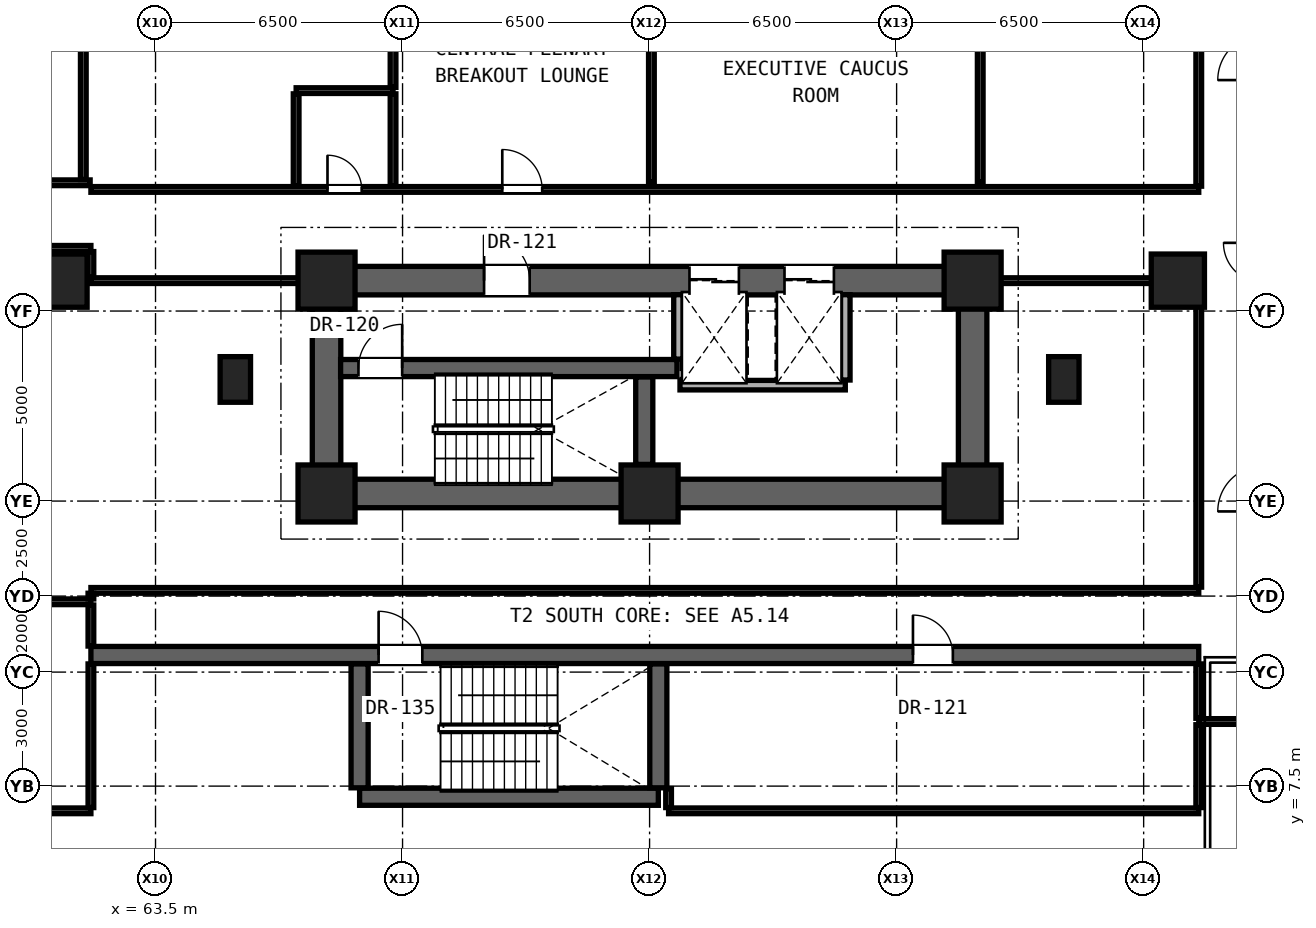
"""IFC4 building model, lengths in metres.
Left out: names, types, materials, properties, quantities, classifications, styles, units other than length and angle.
Written with IfcOpenShell. Run it as: python <this file> out.ifc"""

import sys

from ifc_helpers import new_model, si_unit, direction, frame, frame_2d, origin, origin_2d, place, context, subcontext, project, spatial, rectangle, hollow_rectangle, extrude, element, fill, save


model = new_model("IFC4")
c1 = context("Model", 3, precision=1e-05, world=origin(), true_north=direction((0.0, 1.0)))
c2 = subcontext(c1, "Body", "Model", "MODEL_VIEW")
j1 = project(units=[si_unit("LENGTHUNIT", "METRE"), si_unit("PLANEANGLEUNIT", "RADIAN")], contexts=[c1])
p1 = place(None, origin())
s1 = spatial("IfcSite", under=j1, at=p1, CompositionType="ELEMENT")
p2 = place(p1, origin())
s2 = spatial("IfcBuilding", under=s1, at=p2, CompositionType="ELEMENT")
p3 = place(p2, frame((0.0, 0.0, 13.8)))
s3 = spatial("IfcBuildingStorey", under=s2, at=p3, CompositionType="ELEMENT", Elevation=13.8)
for number, where, z_axis, x_axis in (
    (1, (68.0, 15.2, 0.0), (0.0, 0.0, 1.0), (1.0, 0.0, 0.0)),
    (2, (76.5, 15.2, 0.0), (0.0, 0.0, 1.0), (1.0, 0.0, 0.0)),
    (3, (85.0, 15.2, 0.0), (0.0, 0.0, 1.0), (1.0, 0.0, 0.0)),
    (4, (68.0, 20.8, 0.0), (0.0, 0.0, 1.0), (1.0, 0.0, 0.0)),
    (5, (85.0, 20.8, 0.0), (0.0, 0.0, 1.0), (1.0, 0.0, 0.0)),
):
    element("IfcColumn", number, at=place(p3, frame(where, z_axis=z_axis, x_axis=x_axis)), inside=s3, PredefinedType="COLUMN", context=c2, shape_type="SweptSolid", body=[
        extrude(rectangle(XDim=1.5, YDim=1.5, at=origin_2d()), origin(), (0.0, 0.0, 1.0), 4.3),
    ])
for number, where, z_axis, x_axis in (
    (6, (61.0, 20.8, 0.0), (0.0, 0.0, 1.0), (1.0, 0.0, 0.0)),
    (7, (90.4, 20.8, 0.0), (0.0, 0.0, 1.0), (1.0, 0.0, 0.0)),
):
    element("IfcColumn", number, at=place(p3, frame(where, z_axis=z_axis, x_axis=x_axis)), inside=s3, PredefinedType="COLUMN", context=c2, shape_type="SweptSolid", body=[
        extrude(hollow_rectangle(XDim=1.4, YDim=1.4, WallThickness=0.08, at=origin_2d()), origin(), (0.0, 0.0, 1.0), 4.3),
    ])
for number, where, z_axis, x_axis in (
    (8, (65.6, 18.2, 0.0), (0.0, 0.0, 1.0), (1.0, 0.0, 0.0)),
    (9, (87.4, 18.2, 0.0), (0.0, 0.0, 1.0), (1.0, 0.0, 0.0)),
):
    element("IfcColumn", number, at=place(p3, frame(where, z_axis=z_axis, x_axis=x_axis)), inside=s3, PredefinedType="PILASTER", context=c2, shape_type="SweptSolid", body=[
        extrude(rectangle(XDim=0.8, YDim=1.2, at=origin_2d()), origin(), (0.0, 0.0, 1.0), 4.3),
    ])
p4 = place(p3, frame((68.0, 15.2, 0.0), z_axis=(0.0, 0.0, 1.0), x_axis=(1.0, 0.0, 0.0)))
e10 = element("IfcWall", 10, at=p4, inside=s3, PredefinedType="SHEAR", context=c2, shape_type="SweptSolid", body=[
    extrude(rectangle(XDim=17.0, YDim=0.75, at=frame_2d((8.5, 0.0))), origin(), (0.0, 0.0, 1.0), 3.65),
])
for number, where, z_axis, x_axis in (
    (11, (68.0, 15.2, 0.0), (0.0, 0.0, 1.0), (0.0, 1.0, 0.0)),
    (12, (85.0, 15.2, 0.0), (0.0, 0.0, 1.0), (0.0, 1.0, 0.0)),
):
    element("IfcWall", number, at=place(p3, frame(where, z_axis=z_axis, x_axis=x_axis)), inside=s3, PredefinedType="SHEAR", context=c2, shape_type="SweptSolid", body=[
        extrude(rectangle(XDim=5.6, YDim=0.75, at=frame_2d((2.8, 0.0))), origin(), (0.0, 0.0, 1.0), 3.65),
    ])
p5 = place(p3, frame((68.0, 20.8, 0.0), z_axis=(0.0, 0.0, 1.0), x_axis=(1.0, 0.0, 0.0)))
e13 = element("IfcWall", 13, at=p5, inside=s3, PredefinedType="SHEAR", context=c2, shape_type="SweptSolid", body=[
    extrude(rectangle(XDim=17.0, YDim=0.75, at=frame_2d((8.5, 0.0))), origin(), (0.0, 0.0, 1.0), 3.65),
])
p6 = place(p5, frame((4.145, 0.0, 0.0)))
e14 = element("IfcOpeningElement", 14, at=p6, cuts=e13, PredefinedType="OPENING", context=c2, shape_type="SweptSolid", body=[
    extrude(rectangle(XDim=1.2, YDim=2.25, at=frame_2d((0.6, 1.125))), frame((0.0, 0.385, 0.0), z_axis=(0.0, -1.0, 0.0), x_axis=(1.0, 0.0, 0.0)), (0.0, 0.0, 1.0), 0.77),
])
p7 = place(p5, frame((9.55, 0.0, 0.0)))
e15 = element("IfcOpeningElement", 15, at=p7, cuts=e13, PredefinedType="OPENING", context=c2, shape_type="SweptSolid", body=[
    extrude(rectangle(XDim=1.3, YDim=2.3, at=frame_2d((0.65, 1.15))), frame((0.0, 0.385, 0.0), z_axis=(0.0, -1.0, 0.0), x_axis=(1.0, 0.0, 0.0)), (0.0, 0.0, 1.0), 0.77),
])
p8 = place(p5, frame((12.05, 0.0, 0.0)))
e16 = element("IfcOpeningElement", 16, at=p8, cuts=e13, PredefinedType="OPENING", context=c2, shape_type="SweptSolid", body=[
    extrude(rectangle(XDim=1.3, YDim=2.3, at=frame_2d((0.65, 1.15))), frame((0.0, 0.385, 0.0), z_axis=(0.0, -1.0, 0.0), x_axis=(1.0, 0.0, 0.0)), (0.0, 0.0, 1.0), 0.77),
])
p9 = place(p3, frame((29.4, 6.85, 0.0), z_axis=(0.0, 0.0, 1.0), x_axis=(1.0, 0.0, 0.0)))
e17 = element("IfcWall", 17, at=p9, inside=s3, PredefinedType="PARTITIONING", context=c2, shape_type="SweptSolid", body=[
    extrude(rectangle(XDim=32.4, YDim=0.15, at=frame_2d((16.2, 0.0))), origin(), (0.0, 0.0, 1.0), 2.869),
])
p10 = place(p3, frame((77.0, 6.85, 0.0), z_axis=(0.0, 0.0, 1.0), x_axis=(1.0, 0.0, 0.0)))
e18 = element("IfcWall", 18, at=p10, inside=s3, PredefinedType="PARTITIONING", context=c2, shape_type="SweptSolid", body=[
    extrude(rectangle(XDim=13.95, YDim=0.15, at=frame_2d((6.975, 0.0))), origin(), (0.0, 0.0, 1.0), 2.786),
])
p11 = place(p3, frame((68.87, 7.22, 0.0), z_axis=(0.0, 0.0, 1.0), x_axis=(1.0, 0.0, 0.0)))
e19 = element("IfcWall", 19, at=p11, inside=s3, PredefinedType="SHEAR", context=c2, shape_type="SweptSolid", body=[
    extrude(rectangle(XDim=7.86, YDim=0.45, at=frame_2d((3.93, 0.0))), origin(), (0.0, 0.0, 1.0), 3.65),
])
p12 = place(p3, frame((90.95, 9.2, 0.0), z_axis=(0.0, 0.0, 1.0), x_axis=(1.0, 0.0, 0.0)))
e20 = element("IfcWall", 20, at=p12, inside=s3, PredefinedType="PARTITIONING", context=c2, shape_type="SweptSolid", body=[
    extrude(rectangle(XDim=1.7, YDim=0.15, at=frame_2d((0.85, 0.0))), origin(), (0.0, 0.0, 1.0), 3.65),
])
p13 = place(p3, frame((61.8, 10.95, 0.0), z_axis=(0.0, 0.0, 1.0), x_axis=(1.0, 0.0, 0.0)))
e21 = element("IfcWall", 21, at=p13, inside=s3, PredefinedType="SHEAR", context=c2, shape_type="SweptSolid", body=[
    extrude(rectangle(XDim=29.15, YDim=0.45, at=frame_2d((14.575, 0.0))), origin(), (0.0, 0.0, 1.0), 3.65),
])
p14 = place(p13, frame((7.57, 0.0, 0.0)))
e22 = element("IfcOpeningElement", 22, at=p14, cuts=e21, PredefinedType="OPENING", context=c2, shape_type="SweptSolid", body=[
    extrude(rectangle(XDim=1.15, YDim=2.2, at=frame_2d((0.575, 1.1))), frame((0.0, 0.235, 0.0), z_axis=(0.0, -1.0, 0.0), x_axis=(1.0, 0.0, 0.0)), (0.0, 0.0, 1.0), 0.47),
])
p15 = place(p13, frame((21.63, 0.0, 0.0)))
e23 = element("IfcOpeningElement", 23, at=p15, cuts=e21, PredefinedType="OPENING", context=c2, shape_type="SweptSolid", body=[
    extrude(rectangle(XDim=1.05, YDim=2.2, at=frame_2d((0.525, 1.1))), frame((0.0, 0.235, 0.0), z_axis=(0.0, -1.0, 0.0), x_axis=(1.0, 0.0, 0.0)), (0.0, 0.0, 1.0), 0.47),
])
p16 = place(p3, frame((38.2, 12.35, 0.0), z_axis=(0.0, 0.0, 1.0), x_axis=(1.0, 0.0, 0.0)))
e24 = element("IfcWall", 24, at=p16, inside=s3, PredefinedType="PARTITIONING", context=c2, shape_type="SweptSolid", body=[
    extrude(rectangle(XDim=23.6, YDim=0.15, at=frame_2d((11.8, 0.0))), origin(), (0.0, 0.0, 1.0), 2.602),
])
p17 = place(p3, frame((61.8, 12.65, 0.0), z_axis=(0.0, 0.0, 1.0), x_axis=(1.0, 0.0, 0.0)))
e25 = element("IfcWall", 25, at=p17, inside=s3, PredefinedType="PARTITIONING", context=c2, shape_type="SweptSolid", body=[
    extrude(rectangle(XDim=29.15, YDim=0.15, at=frame_2d((14.575, 0.0))), origin(), (0.0, 0.0, 1.0), 2.786),
])
p18 = place(p3, frame((77.3, 18.05, 0.0), z_axis=(0.0, 0.0, 1.0), x_axis=(1.0, 0.0, 0.0)))
e26 = element("IfcWall", 26, at=p18, inside=s3, PredefinedType="SOLIDWALL", context=c2, shape_type="SweptSolid", body=[
    extrude(rectangle(XDim=4.35, YDim=0.25, at=frame_2d((2.175, 0.0))), origin(), (0.0, 0.0, 1.0), 3.65),
])
p19 = place(p3, frame((68.37, 18.5, 0.0), z_axis=(0.0, 0.0, 1.0), x_axis=(1.0, 0.0, 0.0)))
e27 = element("IfcWall", 27, at=p19, inside=s3, PredefinedType="SHEAR", context=c2, shape_type="SweptSolid", body=[
    extrude(rectangle(XDim=8.85, YDim=0.45, at=frame_2d((4.425, 0.0))), origin(), (0.0, 0.0, 1.0), 3.65),
])
p20 = place(p19, frame((0.47, 0.0, 0.0)))
e28 = element("IfcOpeningElement", 28, at=p20, cuts=e27, PredefinedType="OPENING", context=c2, shape_type="SweptSolid", body=[
    extrude(rectangle(XDim=1.15, YDim=2.2, at=frame_2d((0.575, 1.1))), frame((0.0, 0.235, 0.0), z_axis=(0.0, -1.0, 0.0), x_axis=(1.0, 0.0, 0.0)), (0.0, 0.0, 1.0), 0.47),
])
p21 = place(p3, frame((61.8, 20.8, 0.0), z_axis=(0.0, 0.0, 1.0), x_axis=(1.0, 0.0, 0.0)))
e29 = element("IfcWall", 29, at=p21, inside=s3, PredefinedType="PARTITIONING", context=c2, shape_type="SweptSolid", body=[
    extrude(rectangle(XDim=5.83, YDim=0.15, at=frame_2d((2.915, 0.0))), origin(), (0.0, 0.0, 1.0), 2.542),
])
p22 = place(p3, frame((85.37, 20.8, 0.0), z_axis=(0.0, 0.0, 1.0), x_axis=(1.0, 0.0, 0.0)))
e30 = element("IfcWall", 30, at=p22, inside=s3, PredefinedType="PARTITIONING", context=c2, shape_type="SweptSolid", body=[
    extrude(rectangle(XDim=5.58, YDim=0.15, at=frame_2d((2.79, 0.0))), origin(), (0.0, 0.0, 1.0), 2.542),
])
p23 = place(p3, frame((40.4, 21.65, 0.0), z_axis=(0.0, 0.0, 1.0), x_axis=(1.0, 0.0, 0.0)))
e31 = element("IfcWall", 31, at=p23, inside=s3, PredefinedType="PARTITIONING", context=c2, shape_type="SweptSolid", body=[
    extrude(rectangle(XDim=21.4, YDim=0.15, at=frame_2d((10.7, 0.0))), origin(), (0.0, 0.0, 1.0), 2.602),
])
p24 = place(p3, frame((61.8, 23.2, 0.0), z_axis=(0.0, 0.0, 1.0), x_axis=(1.0, 0.0, 0.0)))
e32 = element("IfcWall", 32, at=p24, inside=s3, PredefinedType="PARTITIONING", context=c2, shape_type="SweptSolid", body=[
    extrude(rectangle(XDim=29.15, YDim=0.15, at=frame_2d((14.575, 0.0))), origin(), (0.0, 0.0, 1.0), 2.715),
])
p25 = place(p24, frame((6.225, 0.0, 0.0)))
e33 = element("IfcOpeningElement", 33, at=p25, cuts=e32, PredefinedType="OPENING", context=c2, shape_type="SweptSolid", body=[
    extrude(rectangle(XDim=0.9, YDim=2.1, at=frame_2d((0.45, 1.05))), frame((0.0, 0.085, 0.0), z_axis=(0.0, -1.0, 0.0), x_axis=(1.0, 0.0, 0.0)), (0.0, 0.0, 1.0), 0.17),
])
p26 = place(p24, frame((10.824, 0.0, 0.0)))
e34 = element("IfcOpeningElement", 34, at=p26, cuts=e32, PredefinedType="OPENING", context=c2, shape_type="SweptSolid", body=[
    extrude(rectangle(XDim=1.05, YDim=2.2, at=frame_2d((0.525, 1.1))), frame((0.0, 0.085, 0.0), z_axis=(0.0, -1.0, 0.0), x_axis=(1.0, 0.0, 0.0)), (0.0, 0.0, 1.0), 0.17),
])
p27 = place(p3, frame((42.65, 23.375, 0.0), z_axis=(0.0, 0.0, 1.0), x_axis=(1.0, 0.0, 0.0)))
e35 = element("IfcWall", 35, at=p27, inside=s3, PredefinedType="PARTITIONING", context=c2, shape_type="SweptSolid", body=[
    extrude(rectangle(XDim=19.13, YDim=0.15, at=frame_2d((9.565, 0.0))), origin(), (0.0, 0.0, 1.0), 2.602),
])
p28 = place(p3, frame((67.2, 25.8, 0.0), z_axis=(0.0, 0.0, 1.0), x_axis=(1.0, 0.0, 0.0)))
e36 = element("IfcWall", 36, at=p28, inside=s3, PredefinedType="PARTITIONING", context=c2, shape_type="SweptSolid", body=[
    extrude(rectangle(XDim=2.55, YDim=0.15, at=frame_2d((1.275, 0.0))), origin(), (0.0, 0.0, 1.0), 2.715),
])
p29 = place(p3, frame((61.6, 23.46, 0.0), z_axis=(0.0, 0.0, 1.0), x_axis=(0.0, 1.0, 0.0)))
e37 = element("IfcWall", 37, at=p29, inside=s3, PredefinedType="PARTITIONING", context=c2, shape_type="SweptSolid", body=[
    extrude(rectangle(XDim=7.855, YDim=0.15, at=frame_2d((3.927, 0.0))), origin(), (0.0, 0.0, 1.0), 2.869),
])
p30 = place(p3, frame((61.8, 6.935, 0.0), z_axis=(0.0, 0.0, 1.0), x_axis=(0.0, 1.0, 0.0)))
e38 = element("IfcWall", 38, at=p30, inside=s3, PredefinedType="PARTITIONING", context=c2, shape_type="SweptSolid", body=[
    extrude(rectangle(XDim=3.78, YDim=0.15, at=frame_2d((1.89, 0.0))), origin(), (0.0, 0.0, 1.0), 3.65),
])
p31 = place(p3, frame((61.8, 11.185, 0.0), z_axis=(0.0, 0.0, 1.0), x_axis=(0.0, 1.0, 0.0)))
e39 = element("IfcWall", 39, at=p31, inside=s3, PredefinedType="PARTITIONING", context=c2, shape_type="SweptSolid", body=[
    extrude(rectangle(XDim=1.08, YDim=0.15, at=frame_2d((0.54, 0.0))), origin(), (0.0, 0.0, 1.0), 3.65),
])
p32 = place(p3, frame((61.8, 12.425, 0.0), z_axis=(0.0, 0.0, 1.0), x_axis=(0.0, 1.0, 0.0)))
e40 = element("IfcWall", 40, at=p32, inside=s3, PredefinedType="PARTITIONING", context=c2, shape_type="SweptSolid", body=[
    extrude(rectangle(XDim=0.15, YDim=0.15, at=frame_2d((0.075, 0.0))), origin(), (0.0, 0.0, 1.0), 3.65),
])
p33 = place(p3, frame((61.8, 20.885, 0.0), z_axis=(0.0, 0.0, 1.0), x_axis=(0.0, 1.0, 0.0)))
e41 = element("IfcWall", 41, at=p33, inside=s3, PredefinedType="PARTITIONING", context=c2, shape_type="SweptSolid", body=[
    extrude(rectangle(XDim=0.68, YDim=0.15, at=frame_2d((0.34, 0.0))), origin(), (0.0, 0.0, 1.0), 2.542),
])
p34 = place(p3, frame((67.2, 23.285, 0.0), z_axis=(0.0, 0.0, 1.0), x_axis=(0.0, 1.0, 0.0)))
e42 = element("IfcWall", 42, at=p34, inside=s3, PredefinedType="PARTITIONING", context=c2, shape_type="SweptSolid", body=[
    extrude(rectangle(XDim=2.43, YDim=0.15, at=frame_2d((1.215, 0.0))), origin(), (0.0, 0.0, 1.0), 3.65),
])
p35 = place(p3, frame((68.87, 7.455, 0.0), z_axis=(0.0, 0.0, 1.0), x_axis=(0.0, 1.0, 0.0)))
e43 = element("IfcWall", 43, at=p35, inside=s3, PredefinedType="SHEAR", context=c2, shape_type="SweptSolid", body=[
    extrude(rectangle(XDim=3.26, YDim=0.45, at=frame_2d((1.63, 0.0))), origin(), (0.0, 0.0, 1.0), 3.65),
])
p36 = place(p3, frame((69.75, 23.285, 0.0), z_axis=(0.0, 0.0, 1.0), x_axis=(0.0, 1.0, 0.0)))
e44 = element("IfcWall", 44, at=p36, inside=s3, PredefinedType="PARTITIONING", context=c2, shape_type="SweptSolid", body=[
    extrude(rectangle(XDim=2.43, YDim=0.15, at=frame_2d((1.215, 0.0))), origin(), (0.0, 0.0, 1.0), 3.65),
])
p37 = place(p3, frame((69.75, 25.885, 0.0), z_axis=(0.0, 0.0, 1.0), x_axis=(0.0, 1.0, 0.0)))
e45 = element("IfcWall", 45, at=p37, inside=s3, PredefinedType="PARTITIONING", context=c2, shape_type="SweptSolid", body=[
    extrude(rectangle(XDim=3.23, YDim=0.15, at=frame_2d((1.615, 0.0))), origin(), (0.0, 0.0, 1.0), 2.715),
])
p38 = place(p3, frame((76.36, 15.965, 0.0), z_axis=(0.0, 0.0, 1.0), x_axis=(0.0, 1.0, 0.0)))
e46 = element("IfcWall", 46, at=p38, inside=s3, PredefinedType="SHEAR", context=c2, shape_type="SweptSolid", body=[
    extrude(rectangle(XDim=2.3, YDim=0.45, at=frame_2d((1.15, 0.0))), origin(), (0.0, 0.0, 1.0), 3.65),
])
p39 = place(p3, frame((76.548, 23.4, 0.0), z_axis=(0.0, 0.0, 1.0), x_axis=(0.0, 1.0, 0.0)))
e47 = element("IfcWall", 47, at=p39, inside=s3, PredefinedType="PARTITIONING", context=c2, shape_type="SweptSolid", body=[
    extrude(rectangle(XDim=5.715, YDim=0.15, at=frame_2d((2.857, 0.0))), origin(), (0.0, 0.0, 1.0), 2.715),
])
p40 = place(p3, frame((76.73, 7.455, 0.0), z_axis=(0.0, 0.0, 1.0), x_axis=(0.0, 1.0, 0.0)))
e48 = element("IfcWall", 48, at=p40, inside=s3, PredefinedType="SHEAR", context=c2, shape_type="SweptSolid", body=[
    extrude(rectangle(XDim=3.26, YDim=0.45, at=frame_2d((1.63, 0.0))), origin(), (0.0, 0.0, 1.0), 3.65),
])
p41 = place(p3, frame((77.0, 6.935, 0.0), z_axis=(0.0, 0.0, 1.0), x_axis=(0.0, 1.0, 0.0)))
e49 = element("IfcWall", 49, at=p41, inside=s3, PredefinedType="PARTITIONING", context=c2, shape_type="SweptSolid", body=[
    extrude(rectangle(XDim=0.5, YDim=0.15, at=frame_2d((0.25, 0.0))), origin(), (0.0, 0.0, 1.0), 3.65),
])
p42 = place(p3, frame((77.26, 18.735, 0.0), z_axis=(0.0, 0.0, 1.0), x_axis=(0.0, 1.0, 0.0)))
e50 = element("IfcWall", 50, at=p42, inside=s3, PredefinedType="SOLIDWALL", context=c2, shape_type="SweptSolid", body=[
    extrude(rectangle(XDim=1.695, YDim=0.25, at=frame_2d((0.847, 0.0))), origin(), (0.0, 0.0, 1.0), 3.65),
])
p43 = place(p3, frame((81.65, 18.185, 0.0), z_axis=(0.0, 0.0, 1.0), x_axis=(0.0, 1.0, 0.0)))
e51 = element("IfcWall", 51, at=p43, inside=s3, PredefinedType="SOLIDWALL", context=c2, shape_type="SweptSolid", body=[
    extrude(rectangle(XDim=2.245, YDim=0.25, at=frame_2d((1.123, 0.0))), origin(), (0.0, 0.0, 1.0), 3.65),
])
p44 = place(p3, frame((85.2, 23.4, 0.0), z_axis=(0.0, 0.0, 1.0), x_axis=(0.0, 1.0, 0.0)))
e52 = element("IfcWall", 52, at=p44, inside=s3, PredefinedType="PARTITIONING", context=c2, shape_type="SweptSolid", body=[
    extrude(rectangle(XDim=5.715, YDim=0.15, at=frame_2d((2.857, 0.0))), origin(), (0.0, 0.0, 1.0), 2.715),
])
p45 = place(p3, frame((90.95, 6.935, 0.0), z_axis=(0.0, 0.0, 1.0), x_axis=(0.0, 1.0, 0.0)))
e53 = element("IfcWall", 53, at=p45, inside=s3, PredefinedType="PARTITIONING", context=c2, shape_type="SweptSolid", body=[
    extrude(rectangle(XDim=2.18, YDim=0.15, at=frame_2d((1.09, 0.0))), origin(), (0.0, 0.0, 1.0), 3.65),
])
p46 = place(p3, frame((90.95, 9.285, 0.0), z_axis=(0.0, 0.0, 1.0), x_axis=(0.0, 1.0, 0.0)))
e54 = element("IfcWall", 54, at=p46, inside=s3, PredefinedType="PARTITIONING", context=c2, shape_type="SweptSolid", body=[
    extrude(rectangle(XDim=1.43, YDim=0.15, at=frame_2d((0.715, 0.0))), origin(), (0.0, 0.0, 1.0), 3.65),
])
p47 = place(p3, frame((90.95, 12.735, 0.0), z_axis=(0.0, 0.0, 1.0), x_axis=(0.0, 1.0, 0.0)))
e55 = element("IfcWall", 55, at=p47, inside=s3, PredefinedType="PARTITIONING", context=c2, shape_type="SweptSolid", body=[
    extrude(rectangle(XDim=7.98, YDim=0.15, at=frame_2d((3.99, 0.0))), origin(), (0.0, 0.0, 1.0), 2.786),
])
p48 = place(p3, frame((90.95, 23.285, 0.0), z_axis=(0.0, 0.0, 1.0), x_axis=(0.0, 1.0, 0.0)))
e56 = element("IfcWall", 56, at=p48, inside=s3, PredefinedType="PARTITIONING", context=c2, shape_type="SweptSolid", body=[
    extrude(rectangle(XDim=6.03, YDim=0.15, at=frame_2d((3.015, 0.0))), origin(), (0.0, 0.0, 1.0), 2.869),
])
p49 = place(p6, origin())
e57 = element("IfcDoor", 57, at=p49, inside=s3, OperationType="SINGLE_SWING_LEFT", PredefinedType="DOOR", context=c2, shape_type="SweptSolid", body=[
    extrude(rectangle(XDim=1.2, YDim=2.25, at=frame_2d((0.6, 1.125))), frame((0.0, 0.025, 0.0), z_axis=(0.0, -1.0, 0.0), x_axis=(1.0, 0.0, 0.0)), (0.0, 0.0, 1.0), 0.05),
])
fill(e14, e57)
p50 = place(p20, origin())
e58 = element("IfcDoor", 58, at=p50, inside=s3, OperationType="SINGLE_SWING_RIGHT", PredefinedType="DOOR", context=c2, shape_type="SweptSolid", body=[
    extrude(rectangle(XDim=1.15, YDim=2.2, at=frame_2d((0.575, 1.1))), frame((0.0, 0.025, 0.0), z_axis=(0.0, -1.0, 0.0), x_axis=(1.0, 0.0, 0.0)), (0.0, 0.0, 1.0), 0.05),
])
fill(e28, e58)
p51 = place(p25, origin())
e59 = element("IfcDoor", 59, at=p51, inside=s3, OperationType="SINGLE_SWING_LEFT", PredefinedType="DOOR", context=c2, shape_type="SweptSolid", body=[
    extrude(rectangle(XDim=0.9, YDim=2.1, at=frame_2d((0.45, 1.05))), frame((0.0, 0.025, 0.0), z_axis=(0.0, -1.0, 0.0), x_axis=(1.0, 0.0, 0.0)), (0.0, 0.0, 1.0), 0.05),
])
fill(e33, e59)
p52 = place(p14, origin())
e60 = element("IfcDoor", 60, at=p52, inside=s3, OperationType="SINGLE_SWING_LEFT", PredefinedType="DOOR", context=c2, shape_type="SweptSolid", body=[
    extrude(rectangle(XDim=1.15, YDim=2.2, at=frame_2d((0.575, 1.1))), frame((0.0, 0.025, 0.0), z_axis=(0.0, -1.0, 0.0), x_axis=(1.0, 0.0, 0.0)), (0.0, 0.0, 1.0), 0.05),
])
fill(e22, e60)
p53 = place(p26, origin())
e61 = element("IfcDoor", 61, at=p53, inside=s3, OperationType="SINGLE_SWING_LEFT", PredefinedType="DOOR", context=c2, shape_type="SweptSolid", body=[
    extrude(rectangle(XDim=1.05, YDim=2.2, at=frame_2d((0.525, 1.1))), frame((0.0, 0.025, 0.0), z_axis=(0.0, -1.0, 0.0), x_axis=(1.0, 0.0, 0.0)), (0.0, 0.0, 1.0), 0.05),
])
fill(e34, e61)
p54 = place(p15, origin())
e62 = element("IfcDoor", 62, at=p54, inside=s3, OperationType="SINGLE_SWING_LEFT", PredefinedType="DOOR", context=c2, shape_type="SweptSolid", body=[
    extrude(rectangle(XDim=1.05, YDim=2.2, at=frame_2d((0.525, 1.1))), frame((0.0, 0.025, 0.0), z_axis=(0.0, -1.0, 0.0), x_axis=(1.0, 0.0, 0.0)), (0.0, 0.0, 1.0), 0.05),
])
fill(e23, e62)
p55 = place(p7, origin())
e63 = element("IfcDoor", 63, at=p55, inside=s3, OperationType="DOUBLE_DOOR_SLIDING", PredefinedType="DOOR", context=c2, shape_type="SweptSolid", body=[
    extrude(rectangle(XDim=1.3, YDim=2.3, at=frame_2d((0.65, 1.15))), frame((0.0, 0.025, 0.0), z_axis=(0.0, -1.0, 0.0), x_axis=(1.0, 0.0, 0.0)), (0.0, 0.0, 1.0), 0.05),
])
fill(e15, e63)
p56 = place(p8, origin())
e64 = element("IfcDoor", 64, at=p56, inside=s3, OperationType="DOUBLE_DOOR_SLIDING", PredefinedType="DOOR", context=c2, shape_type="SweptSolid", body=[
    extrude(rectangle(XDim=1.3, YDim=2.3, at=frame_2d((0.65, 1.15))), frame((0.0, 0.025, 0.0), z_axis=(0.0, -1.0, 0.0), x_axis=(1.0, 0.0, 0.0)), (0.0, 0.0, 1.0), 0.05),
])
fill(e16, e64)
save(model, sys.argv[1])
